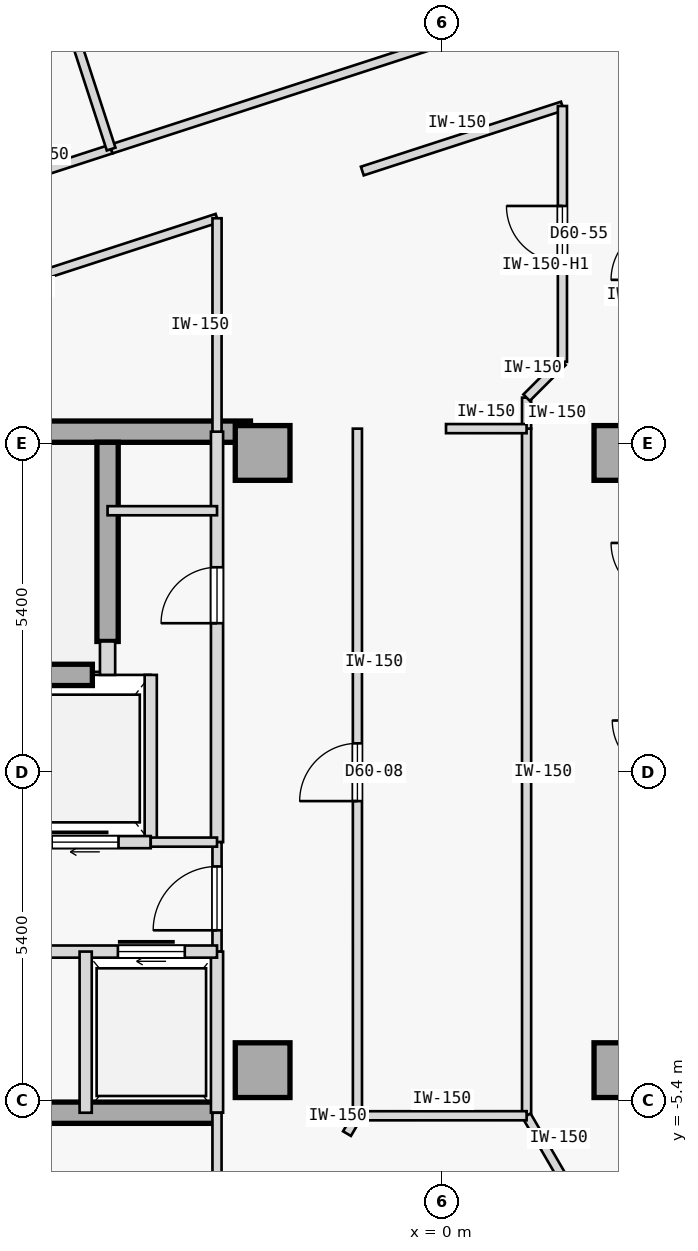
"""IFC4 building model, lengths in metres.
Left out: names, types, materials, properties, quantities, classifications, styles, units other than length and angle.
Written with IfcOpenShell. Run it as: python <this file> out.ifc"""

import sys

from ifc_helpers import new_model, si_unit, direction, frame, frame_2d, origin, origin_2d, place, context, subcontext, project, spatial, rectangle, extrude, element, fill, save


model = new_model("IFC4")
c1 = context("Model", 3, precision=1e-05, world=origin(), true_north=direction((0.0, 1.0)))
c2 = subcontext(c1, "Body", "Model", "MODEL_VIEW")
j1 = project(units=[si_unit("LENGTHUNIT", "METRE"), si_unit("PLANEANGLEUNIT", "RADIAN")], contexts=[c1])
p1 = place(None, origin())
s1 = spatial("IfcSite", under=j1, at=p1, CompositionType="ELEMENT")
p2 = place(p1, origin())
s2 = spatial("IfcBuilding", under=s1, at=p2, CompositionType="ELEMENT")
p3 = place(p2, frame((0.0, 0.0, 227.65)))
s3 = spatial("IfcBuildingStorey", under=s2, at=p3, CompositionType="ELEMENT", Elevation=227.65)
for number, where, z_axis, x_axis in (
    (1, (-2.95, -4.9, 0.0), (0.0, 0.0, 1.0), (1.0, 0.0, 0.0)),
    (2, (-2.95, 5.25, 0.0), (0.0, 0.0, 1.0), (1.0, 0.0, 0.0)),
    (3, (2.95, -4.9, 0.0), (0.0, 0.0, 1.0), (1.0, 0.0, 0.0)),
    (4, (2.95, 5.25, 0.0), (0.0, 0.0, 1.0), (1.0, 0.0, 0.0)),
):
    element("IfcColumn", number, at=place(p3, frame(where, z_axis=z_axis, x_axis=x_axis)), inside=s3, PredefinedType="COLUMN", context=c2, shape_type="SweptSolid", body=[
        extrude(rectangle(XDim=0.9, YDim=0.9, at=origin_2d()), origin(), (0.0, 0.0, 1.0), 3.35),
    ])
p4 = place(p3, frame((-14.56, 5.6, 0.0), z_axis=(0.0, 0.0, 1.0), x_axis=(1.0, 0.0, 0.0)))
e5 = element("IfcWall", 5, at=p4, inside=s3, PredefinedType="SHEAR", context=c2, shape_type="SweptSolid", body=[
    extrude(rectangle(XDim=11.41, YDim=0.35, at=frame_2d((5.705, 0.0))), origin(), (0.0, 0.0, 1.0), 3.125),
])
p5 = place(p3, frame((-14.56, -5.6, 0.0), z_axis=(0.0, 0.0, 1.0), x_axis=(1.0, 0.0, 0.0)))
e6 = element("IfcWall", 6, at=p5, inside=s3, PredefinedType="SHEAR", context=c2, shape_type="SweptSolid", body=[
    extrude(rectangle(XDim=10.86, YDim=0.35, at=frame_2d((5.43, 0.0))), origin(), (0.0, 0.0, 1.0), 3.125),
])
p6 = place(p3, frame((-5.5, 2.15, 0.0), z_axis=(0.0, 0.0, 1.0), x_axis=(0.0, 1.0, 0.0)))
e7 = element("IfcWall", 7, at=p6, inside=s3, PredefinedType="SHEAR", context=c2, shape_type="SweptSolid", body=[
    extrude(rectangle(XDim=3.275, YDim=0.35, at=frame_2d((1.638, 0.0))), origin(), (0.0, 0.0, 1.0), 3.125),
])
p7 = place(p3, frame((-10.9, 1.6, 0.0), z_axis=(0.0, 0.0, 1.0), x_axis=(1.0, 0.0, 0.0)))
e8 = element("IfcWall", 8, at=p7, inside=s3, PredefinedType="SHEAR", context=c2, shape_type="SweptSolid", body=[
    extrude(rectangle(XDim=5.15, YDim=0.35, at=frame_2d((2.575, 0.0))), origin(), (0.0, 0.0, 1.0), 3.125),
])
p8 = place(p3, frame((-5.5, 1.6, 0.0), z_axis=(0.0, 0.0, 1.0), x_axis=(0.0, 1.0, 0.0)))
e9 = element("IfcWall", 9, at=p8, inside=s3, PredefinedType="STANDARD", context=c2, shape_type="SweptSolid", body=[
    extrude(rectangle(XDim=0.55, YDim=0.25, at=frame_2d((0.275, 0.0))), origin(), (0.0, 0.0, 1.0), 3.125),
])
p9 = place(p3, frame((-3.7, -1.15, 0.0), z_axis=(0.0, 0.0, 1.0), x_axis=(0.0, 1.0, 0.0)))
e10 = element("IfcWall", 10, at=p9, inside=s3, PredefinedType="STANDARD", context=c2, shape_type="SweptSolid", body=[
    extrude(rectangle(XDim=6.75, YDim=0.2, at=frame_2d((3.375, 0.0))), origin(), (0.0, 0.0, 1.0), 3.125),
])
p10 = place(p9, frame((3.6, 0.0, 0.0)))
e11 = element("IfcOpeningElement", 11, at=p10, cuts=e10, PredefinedType="OPENING", context=c2, shape_type="SweptSolid", body=[
    extrude(rectangle(XDim=0.92, YDim=2.15, at=frame_2d((0.46, 1.075))), frame((0.0, 0.11, 0.0), z_axis=(0.0, -1.0, 0.0), x_axis=(1.0, 0.0, 0.0)), (0.0, 0.0, 1.0), 0.22),
])
p11 = place(p3, frame((-3.7, -2.95, 0.0), z_axis=(0.0, 0.0, 1.0), x_axis=(0.0, 1.0, 0.0)))
e12 = element("IfcWall", 12, at=p11, inside=s3, PredefinedType="PARTITIONING", context=c2, shape_type="SweptSolid", body=[
    extrude(rectangle(XDim=1.8, YDim=0.15, at=frame_2d((0.9, 0.0))), origin(), (0.0, 0.0, 1.0), 3.125),
])
p12 = place(p11, frame((0.35, 0.0, 0.0)))
e13 = element("IfcOpeningElement", 13, at=p12, cuts=e12, PredefinedType="OPENING", context=c2, shape_type="SweptSolid", body=[
    extrude(rectangle(XDim=1.05, YDim=2.18, at=frame_2d((0.525, 1.09))), frame((0.0, 0.085, 0.0), z_axis=(0.0, -1.0, 0.0), x_axis=(1.0, 0.0, 0.0)), (0.0, 0.0, 1.0), 0.17),
])
p13 = place(p3, frame((-3.7, -5.6, 0.0), z_axis=(0.0, 0.0, 1.0), x_axis=(0.0, 1.0, 0.0)))
e14 = element("IfcWall", 14, at=p13, inside=s3, PredefinedType="STANDARD", context=c2, shape_type="SweptSolid", body=[
    extrude(rectangle(XDim=2.65, YDim=0.2, at=frame_2d((1.325, 0.0))), origin(), (0.0, 0.0, 1.0), 3.125),
])
p14 = place(p3, frame((-4.79, -1.15, 0.0), z_axis=(0.0, 0.0, 1.0), x_axis=(0.0, 1.0, 0.0)))
e15 = element("IfcWall", 15, at=p14, inside=s3, PredefinedType="STANDARD", context=c2, shape_type="SweptSolid", body=[
    extrude(rectangle(XDim=2.75, YDim=0.2, at=frame_2d((1.375, 0.0))), origin(), (0.0, 0.0, 1.0), 3.125),
])
p15 = place(p3, frame((-6.95, -1.15, 0.0), z_axis=(0.0, 0.0, 1.0), x_axis=(1.0, 0.0, 0.0)))
e16 = element("IfcWall", 16, at=p15, inside=s3, PredefinedType="STANDARD", context=c2, shape_type="SweptSolid", body=[
    extrude(rectangle(XDim=2.16, YDim=0.2, at=frame_2d((1.08, 0.0))), origin(), (0.0, 0.0, 1.0), 3.125),
])
p16 = place(p15, frame((0.53, 0.0, 0.0)))
e17 = element("IfcOpeningElement", 17, at=p16, cuts=e16, PredefinedType="OPENING", context=c2, shape_type="SweptSolid", body=[
    extrude(rectangle(XDim=1.1, YDim=2.15, at=frame_2d((0.55, 1.075))), frame((0.0, 0.11, 0.0), z_axis=(0.0, -1.0, 0.0), x_axis=(1.0, 0.0, 0.0)), (0.0, 0.0, 1.0), 0.22),
])
p17 = place(p3, frame((-4.79, -1.15, 0.0), z_axis=(0.0, 0.0, 1.0), x_axis=(1.0, 0.0, 0.0)))
e18 = element("IfcWall", 18, at=p17, inside=s3, PredefinedType="PARTITIONING", context=c2, shape_type="SweptSolid", body=[
    extrude(rectangle(XDim=1.09, YDim=0.15, at=frame_2d((0.545, 0.0))), origin(), (0.0, 0.0, 1.0), 3.125),
])
p18 = place(p3, frame((-14.5, -2.95, 0.0), z_axis=(0.0, 0.0, 1.0), x_axis=(1.0, 0.0, 0.0)))
e19 = element("IfcWall", 19, at=p18, inside=s3, PredefinedType="STANDARD", context=c2, shape_type="SweptSolid", body=[
    extrude(rectangle(XDim=10.8, YDim=0.2, at=frame_2d((5.4, 0.0))), origin(), (0.0, 0.0, 1.0), 3.125),
])
p19 = place(p18, frame((9.17, 0.0, 0.0)))
e20 = element("IfcOpeningElement", 20, at=p19, cuts=e19, PredefinedType="OPENING", context=c2, shape_type="SweptSolid", body=[
    extrude(rectangle(XDim=1.1, YDim=2.15, at=frame_2d((0.55, 1.075))), frame((0.0, 0.11, 0.0), z_axis=(0.0, -1.0, 0.0), x_axis=(1.0, 0.0, 0.0)), (0.0, 0.0, 1.0), 0.22),
])
p20 = place(p18, frame((2.13, 0.0, 0.0)))
e21 = element("IfcOpeningElement", 21, at=p20, cuts=e19, PredefinedType="OPENING", context=c2, shape_type="SweptSolid", body=[
    extrude(rectangle(XDim=0.92, YDim=2.15, at=frame_2d((0.46, 1.075))), frame((0.0, 0.11, 0.0), z_axis=(0.0, -1.0, 0.0), x_axis=(1.0, 0.0, 0.0)), (0.0, 0.0, 1.0), 0.22),
])
p21 = place(p18, frame((6.45, 0.0, 0.0)))
e22 = element("IfcOpeningElement", 22, at=p21, cuts=e19, PredefinedType="OPENING", context=c2, shape_type="SweptSolid", body=[
    extrude(rectangle(XDim=0.92, YDim=2.15, at=frame_2d((0.46, 1.075))), frame((0.0, 0.11, 0.0), z_axis=(0.0, -1.0, 0.0), x_axis=(1.0, 0.0, 0.0)), (0.0, 0.0, 1.0), 0.22),
])
p22 = place(p3, frame((-5.86, -5.6, 0.0), z_axis=(0.0, 0.0, 1.0), x_axis=(0.0, 1.0, 0.0)))
e23 = element("IfcWall", 23, at=p22, inside=s3, PredefinedType="STANDARD", context=c2, shape_type="SweptSolid", body=[
    extrude(rectangle(XDim=2.65, YDim=0.2, at=frame_2d((1.325, 0.0))), origin(), (0.0, 0.0, 1.0), 3.125),
])
p23 = place(p3, frame((-5.5, 4.3, 0.0), z_axis=(0.0, 0.0, 1.0), x_axis=(1.0, 0.0, 0.0)))
e24 = element("IfcWall", 24, at=p23, inside=s3, PredefinedType="PARTITIONING", context=c2, shape_type="SweptSolid", body=[
    extrude(rectangle(XDim=1.8, YDim=0.15, at=frame_2d((0.9, 0.0))), origin(), (0.0, 0.0, 1.0), 3.125),
])
p24 = place(p3, frame((-1.391, -5.65, 0.0), z_axis=(0.0, 0.0, 1.0), x_axis=(-8.6422954e-05, 0.999999996266, 0.0)))
e25 = element("IfcWall", 25, at=p24, inside=s3, PredefinedType="PARTITIONING", context=c2, shape_type="SweptSolid", body=[
    extrude(rectangle(XDim=11.3, YDim=0.15, at=frame_2d((5.65, 0.0))), origin(), (0.0, 0.0, 1.0), 3.125),
])
p25 = place(p24, frame((5.175, 0.0, 0.0)))
e26 = element("IfcOpeningElement", 26, at=p25, cuts=e25, PredefinedType="OPENING", context=c2, shape_type="SweptSolid", body=[
    extrude(rectangle(XDim=0.95, YDim=2.15, at=frame_2d((0.475, 1.075))), frame((0.0, 0.085, 0.0), z_axis=(0.0, -1.0, 0.0), x_axis=(1.0, 0.0, 0.0)), (0.0, 0.0, 1.0), 0.17),
])
p26 = place(p3, frame((1.391, -5.648, 0.0), z_axis=(0.0, 0.0, 1.0), x_axis=(-4.3218947e-05, 0.999999999066, 0.0)))
e27 = element("IfcWall", 27, at=p26, inside=s3, PredefinedType="PARTITIONING", context=c2, shape_type="SweptSolid", body=[
    extrude(rectangle(XDim=11.298, YDim=0.15, at=frame_2d((5.649, 0.0))), origin(), (0.0, 0.0, 1.0), 3.125),
])
p27 = place(p3, frame((-19.497, 5.68, 0.0), z_axis=(0.0, 0.0, 1.0), x_axis=(0.95105300492, 0.309027801067, 0.0)))
e28 = element("IfcWall", 28, at=p27, inside=s3, PredefinedType="PARTITIONING", context=c2, shape_type="SweptSolid", body=[
    extrude(rectangle(XDim=14.779, YDim=0.15, at=frame_2d((7.39, 0.0))), origin(), (0.0, 0.0, 1.0), 3.125),
])
p28 = place(p27, frame((6.915, 0.0, 0.0)))
e29 = element("IfcOpeningElement", 29, at=p28, cuts=e28, PredefinedType="OPENING", context=c2, shape_type="SweptSolid", body=[
    extrude(rectangle(XDim=0.95, YDim=2.15, at=frame_2d((0.475, 1.075))), frame((0.0, 0.085, 0.0), z_axis=(0.0, -1.0, 0.0), x_axis=(1.0, 0.0, 0.0)), (0.0, 0.0, 1.0), 0.17),
])
p29 = place(p3, frame((-5.441, 10.247, 0.0), z_axis=(0.0, 0.0, 1.0), x_axis=(0.951062860421, 0.308997468483, 0.0)))
e30 = element("IfcWall", 30, at=p29, inside=s3, PredefinedType="PARTITIONING", context=c2, shape_type="SweptSolid", body=[
    extrude(rectangle(XDim=6.542, YDim=0.15, at=frame_2d((3.271, 0.0))), origin(), (0.0, 0.0, 1.0), 3.125),
])
p30 = place(p3, frame((-1.562, -5.944, 0.0), z_axis=(0.0, 0.0, 1.0), x_axis=(0.505387839696, 0.862892305845, 0.0)))
e31 = element("IfcWall", 31, at=p30, inside=s3, PredefinedType="PARTITIONING", context=c2, shape_type="SweptSolid", body=[
    extrude(rectangle(XDim=0.34, YDim=0.15, at=frame_2d((0.17, 0.0))), origin(), (0.0, 0.0, 1.0), 3.125),
])
p31 = place(p3, frame((1.391, -5.649, 0.0), z_axis=(0.0, 0.0, 1.0), x_axis=(0.502522642426, -0.864564048437, 0.0)))
e32 = element("IfcWall", 32, at=p31, inside=s3, PredefinedType="PARTITIONING", context=c2, shape_type="SweptSolid", body=[
    extrude(rectangle(XDim=1.171, YDim=0.15, at=frame_2d((0.586, 0.0))), origin(), (0.0, 0.0, 1.0), 3.125),
])
p32 = place(p3, frame((-3.7, -11.514, 0.0), z_axis=(0.0, 0.0, 1.0), x_axis=(-8.2572974e-05, 0.999999996591, 0.0)))
e33 = element("IfcWall", 33, at=p32, inside=s3, PredefinedType="PARTITIONING", context=c2, shape_type="SweptSolid", body=[
    extrude(rectangle(XDim=5.913, YDim=0.15, at=frame_2d((2.957, 0.0))), origin(), (0.0, 0.0, 1.0), 3.125),
])
p33 = place(p32, frame((2.497, 0.0, 0.0)))
e34 = element("IfcOpeningElement", 34, at=p33, cuts=e33, PredefinedType="OPENING", context=c2, shape_type="SweptSolid", body=[
    extrude(rectangle(XDim=0.92, YDim=2.15, at=frame_2d((0.46, 1.075))), frame((0.0, 0.085, 0.0), z_axis=(0.0, -1.0, 0.0), x_axis=(1.0, 0.0, 0.0)), (0.0, 0.0, 1.0), 0.17),
])
p34 = place(p3, frame((-1.311, 9.886, 0.0), z_axis=(0.0, 0.0, 1.0), x_axis=(0.951068803905, 0.308979174442, 0.0)))
e35 = element("IfcWall", 35, at=p34, inside=s3, PredefinedType="PARTITIONING", context=c2, shape_type="SweptSolid", body=[
    extrude(rectangle(XDim=3.46, YDim=0.15, at=frame_2d((1.73, 0.0))), origin(), (0.0, 0.0, 1.0), 3.125),
])
p35 = place(p3, frame((1.391, 5.649, 0.0), z_axis=(0.0, 0.0, 1.0), x_axis=(0.000957395444, 0.999999541697, 0.0)))
e36 = element("IfcWall", 36, at=p35, inside=s3, PredefinedType="PARTITIONING", context=c2, shape_type="SweptSolid", body=[
    extrude(rectangle(XDim=0.51, YDim=0.15, at=frame_2d((0.255, 0.0))), origin(), (0.0, 0.0, 1.0), 3.125),
])
p36 = place(p3, frame((1.391, 6.159, 0.0), z_axis=(0.0, 0.0, 1.0), x_axis=(0.707106781187, 0.707106781187, 0.0)))
e37 = element("IfcWall", 37, at=p36, inside=s3, PredefinedType="PARTITIONING", context=c2, shape_type="SweptSolid", body=[
    extrude(rectangle(XDim=0.833, YDim=0.15, at=frame_2d((0.417, 0.0))), origin(), (0.0, 0.0, 1.0), 3.125),
])
p37 = place(p3, frame((1.98, 6.748, 0.0), z_axis=(0.0, 0.0, 1.0), x_axis=(0.0, 1.0, 0.0)))
e38 = element("IfcWall", 38, at=p37, inside=s3, PredefinedType="PARTITIONING", context=c2, shape_type="SweptSolid", body=[
    extrude(rectangle(XDim=4.207, YDim=0.15, at=frame_2d((2.104, 0.0))), origin(), (0.0, 0.0, 1.0), 2.675),
])
p38 = place(p37, frame((1.643, 0.0, 0.0)))
e39 = element("IfcOpeningElement", 39, at=p38, cuts=e38, PredefinedType="OPENING", context=c2, shape_type="SweptSolid", body=[
    extrude(rectangle(XDim=0.92, YDim=2.15, at=frame_2d((0.46, 1.075))), frame((0.0, 0.085, 0.0), z_axis=(0.0, -1.0, 0.0), x_axis=(1.0, 0.0, 0.0)), (0.0, 0.0, 1.0), 0.17),
])
p39 = place(p3, frame((-10.612, 6.864, 0.0), z_axis=(0.0, 0.0, 1.0), x_axis=(0.951060972078, 0.309003280548, 0.0)))
e40 = element("IfcWall", 40, at=p39, inside=s3, PredefinedType="PARTITIONING", context=c2, shape_type="SweptSolid", body=[
    extrude(rectangle(XDim=7.268, YDim=0.15, at=frame_2d((3.634, 0.0))), origin(), (0.0, 0.0, 1.0), 3.125),
])
p40 = place(p39, frame((3.174, 0.0, 0.0)))
e41 = element("IfcOpeningElement", 41, at=p40, cuts=e40, PredefinedType="OPENING", context=c2, shape_type="SweptSolid", body=[
    extrude(rectangle(XDim=0.92, YDim=2.15, at=frame_2d((0.46, 1.075))), frame((0.0, 0.085, 0.0), z_axis=(0.0, -1.0, 0.0), x_axis=(1.0, 0.0, 0.0)), (0.0, 0.0, 1.0), 0.17),
])
p41 = place(p3, frame((-3.7, 5.6, 0.0), z_axis=(0.0, 0.0, 1.0), x_axis=(0.000139120755, 0.999999990323, 0.0)))
e42 = element("IfcWall", 42, at=p41, inside=s3, PredefinedType="PARTITIONING", context=c2, shape_type="SweptSolid", body=[
    extrude(rectangle(XDim=3.51, YDim=0.15, at=frame_2d((1.755, 0.0))), origin(), (0.0, 0.0, 1.0), 3.125),
])
p42 = place(p3, frame((-1.391, -5.65, 0.0), z_axis=(0.0, 0.0, 1.0), x_axis=(0.999999965344, 0.000263273356, 0.0)))
e43 = element("IfcWall", 43, at=p42, inside=s3, PredefinedType="PARTITIONING", context=c2, shape_type="SweptSolid", body=[
    extrude(rectangle(XDim=2.782, YDim=0.15, at=frame_2d((1.391, 0.0))), origin(), (0.0, 0.0, 1.0), 3.125),
])
p43 = place(p3, frame((0.066, 5.65, 0.0), z_axis=(0.0, 0.0, 1.0), x_axis=(0.999999932094, -0.000368527707, 0.0)))
e44 = element("IfcWall", 44, at=p43, inside=s3, PredefinedType="PARTITIONING", context=c2, shape_type="SweptSolid", body=[
    extrude(rectangle(XDim=1.325, YDim=0.15, at=frame_2d((0.663, 0.0))), origin(), (0.0, 0.0, 1.0), 3.125),
])
p44 = place(p3, frame((-5.441, 10.247, 0.0), z_axis=(0.0, 0.0, 1.0), x_axis=(-0.309039081864, 0.951049339351, 0.0)))
e45 = element("IfcWall", 45, at=p44, inside=s3, PredefinedType="PARTITIONING", context=c2, shape_type="SweptSolid", body=[
    extrude(rectangle(XDim=7.284, YDim=0.15, at=frame_2d((3.642, 0.0))), origin(), (0.0, 0.0, 1.0), 3.125),
])
p45 = place(p12, origin())
e46 = element("IfcDoor", 46, at=p45, inside=s3, OperationType="SINGLE_SWING_LEFT", PredefinedType="DOOR", context=c2, shape_type="SweptSolid", body=[
    extrude(rectangle(XDim=1.05, YDim=2.18, at=frame_2d((0.525, 1.09))), frame((0.0, 0.025, 0.0), z_axis=(0.0, -1.0, 0.0), x_axis=(1.0, 0.0, 0.0)), (0.0, 0.0, 1.0), 0.05),
])
fill(e13, e46)
p46 = place(p16, origin())
e47 = element("IfcDoor", 47, at=p46, inside=s3, OperationType="SLIDING_TO_RIGHT", PredefinedType="DOOR", context=c2, shape_type="SweptSolid", body=[
    extrude(rectangle(XDim=1.1, YDim=2.15, at=frame_2d((0.55, 1.075))), frame((0.0, 0.025, 0.0), z_axis=(0.0, -1.0, 0.0), x_axis=(1.0, 0.0, 0.0)), (0.0, 0.0, 1.0), 0.05),
])
fill(e17, e47)
p47 = place(p19, origin())
e48 = element("IfcDoor", 48, at=p47, inside=s3, OperationType="SLIDING_TO_RIGHT", PredefinedType="DOOR", context=c2, shape_type="SweptSolid", body=[
    extrude(rectangle(XDim=1.1, YDim=2.15, at=frame_2d((0.55, 1.075))), frame((0.0, 0.025, 0.0), z_axis=(0.0, -1.0, 0.0), x_axis=(1.0, 0.0, 0.0)), (0.0, 0.0, 1.0), 0.05),
])
fill(e20, e48)
p48 = place(p10, origin())
e49 = element("IfcDoor", 49, at=p48, inside=s3, OperationType="SINGLE_SWING_LEFT", PredefinedType="DOOR", context=c2, shape_type="SweptSolid", body=[
    extrude(rectangle(XDim=0.92, YDim=2.15, at=frame_2d((0.46, 1.075))), frame((0.0, 0.025, 0.0), z_axis=(0.0, -1.0, 0.0), x_axis=(1.0, 0.0, 0.0)), (0.0, 0.0, 1.0), 0.05),
])
fill(e11, e49)
p49 = place(p25, origin())
e50 = element("IfcDoor", 50, at=p49, inside=s3, OperationType="SINGLE_SWING_LEFT", PredefinedType="DOOR", context=c2, shape_type="SweptSolid", body=[
    extrude(rectangle(XDim=0.95, YDim=2.15, at=frame_2d((0.475, 1.075))), frame((0.0, 0.025, 0.0), z_axis=(0.0, -1.0, 0.0), x_axis=(1.0, 0.0, 0.0)), (0.0, 0.0, 1.0), 0.05),
])
fill(e26, e50)
p50 = place(p38, origin())
e51 = element("IfcDoor", 51, at=p50, inside=s3, OperationType="SINGLE_SWING_RIGHT", PredefinedType="DOOR", context=c2, shape_type="SweptSolid", body=[
    extrude(rectangle(XDim=0.92, YDim=2.15, at=frame_2d((0.46, 1.075))), frame((0.0, 0.025, 0.0), z_axis=(0.0, -1.0, 0.0), x_axis=(1.0, 0.0, 0.0)), (0.0, 0.0, 1.0), 0.05),
])
fill(e39, e51)
save(model, sys.argv[1])
